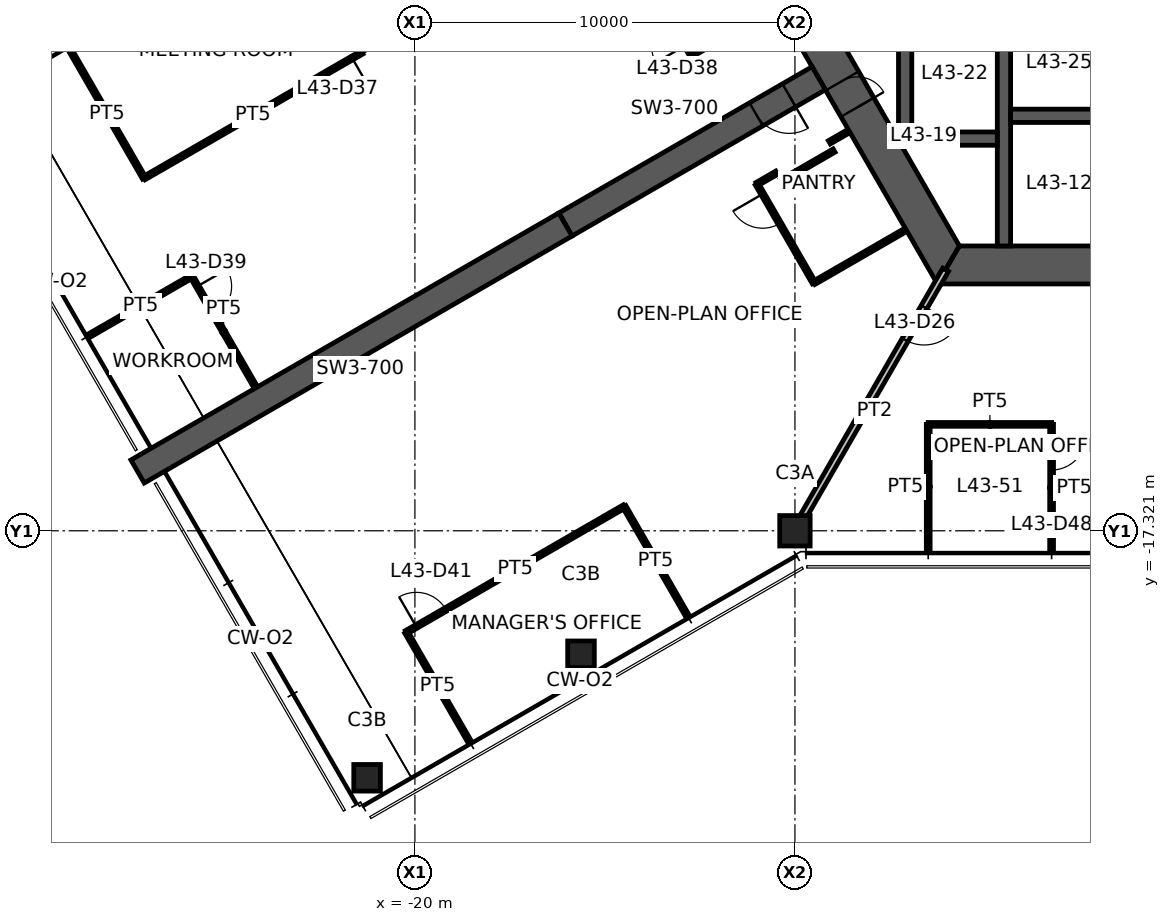
"""IFC4 building model, lengths in metres.
Left out: names, types, materials, properties, quantities, classifications, styles, units other than length and angle.
Written with IfcOpenShell. Run it as: python <this file> out.ifc"""

import sys

from ifc_helpers import new_model, si_unit, direction, frame, frame_2d, origin, origin_2d, place, context, subcontext, project, spatial, polyline, rectangle, hollow_rectangle, outline, extrude, element, fill, save


model = new_model("IFC4")
c1 = context("Model", 3, precision=1e-05, world=origin(), true_north=direction((0.0, 1.0)))
c2 = subcontext(c1, "Body", "Model", "MODEL_VIEW")
j1 = project(units=[si_unit("LENGTHUNIT", "METRE"), si_unit("PLANEANGLEUNIT", "RADIAN")], contexts=[c1])
p1 = place(None, origin())
s1 = spatial("IfcSite", under=j1, at=p1, CompositionType="ELEMENT")
p2 = place(p1, origin())
s2 = spatial("IfcBuilding", under=s1, at=p2, CompositionType="ELEMENT")
p3 = place(p2, frame((0.0, 0.0, 172.1)))
s3 = spatial("IfcBuildingStorey", under=s2, at=p3, CompositionType="ELEMENT", Elevation=172.1)
p4 = place(p3, frame((-10.0, -17.321, 0.0), z_axis=(0.0, 0.0, 1.0), x_axis=(1.0, 0.0, 0.0)))
e1 = element("IfcColumn", 1, at=p4, inside=s3, PredefinedType="COLUMN", context=c2, shape_type="SweptSolid", body=[
    extrude(hollow_rectangle(XDim=0.8, YDim=0.8, WallThickness=0.045, at=origin_2d()), origin(), (0.0, 0.0, 1.0), 3.9),
])
for number, where, z_axis, x_axis in (
    (2, (-15.629, -20.571, 0.0), (0.0, 0.0, 1.0), (1.0, 0.0, 0.0)),
    (3, (-21.258, -23.821, 0.0), (0.0, 0.0, 1.0), (1.0, 0.0, 0.0)),
):
    element("IfcColumn", number, at=place(p3, frame(where, z_axis=z_axis, x_axis=x_axis)), inside=s3, PredefinedType="COLUMN", context=c2, shape_type="SweptSolid", body=[
        extrude(hollow_rectangle(XDim=0.7, YDim=0.7, WallThickness=0.036, at=origin_2d()), origin(), (0.0, 0.0, 1.0), 3.9),
    ])
p5 = place(p3, frame((-11.922, 0.0, 0.0), z_axis=(0.0, 0.0, 1.0), x_axis=(0.500004296715, -0.866022923061, 0.0)))
e4 = element("IfcWall", 4, at=p5, inside=s3, PredefinedType="SHEAR", context=c2, shape_type="SweptSolid", body=[
    extrude(outline(polyline([(-0.289, -0.5), (6.331, -0.5), (7.131, -0.5), (12.211, -0.5), (11.634, 0.5), (7.131, 0.5), (6.331, 0.5), (0.289, 0.5), (-0.289, -0.5)])), origin(), (0.0, 0.0, 1.0), 3.9),
])
p6 = place(p5, frame((6.331, 0.0, 0.0)))
e5 = element("IfcOpeningElement", 5, at=p6, cuts=e4, PredefinedType="OPENING", context=c2, shape_type="SweptSolid", body=[
    extrude(rectangle(XDim=0.8, YDim=2.1, at=frame_2d((0.4, 1.05))), frame((0.0, 0.51, 0.0), z_axis=(0.0, -1.0, 0.0), x_axis=(1.0, 0.0, 0.0)), (0.0, 0.0, 1.0), 1.02),
])
p7 = place(p3, frame((-5.961, -10.325, 0.0), z_axis=(0.0, 0.0, 1.0), x_axis=(1.0, 0.0, 0.0)))
e6 = element("IfcWall", 6, at=p7, inside=s3, PredefinedType="SHEAR", context=c2, shape_type="SweptSolid", body=[
    extrude(outline(polyline([(-0.289, -0.5), (5.461, -0.5), (6.461, -0.5), (12.211, -0.5), (11.634, 0.5), (6.461, 0.5), (5.461, 0.5), (0.289, 0.5), (-0.289, -0.5)])), origin(), (0.0, 0.0, 1.0), 3.9),
])
p8 = place(p7, frame((5.461, 0.0, 0.0)))
e7 = element("IfcOpeningElement", 7, at=p8, cuts=e6, PredefinedType="OPENING", context=c2, shape_type="SweptSolid", body=[
    extrude(rectangle(XDim=1.0, YDim=2.1, at=frame_2d((0.5, 1.05))), frame((0.0, 0.51, 0.0), z_axis=(0.0, -1.0, 0.0), x_axis=(1.0, 0.0, 0.0)), (0.0, 0.0, 1.0), 1.02),
])
p9 = place(p3, frame((-9.375, -5.413, 0.0), z_axis=(0.0, 0.0, 1.0), x_axis=(-0.866032377459, -0.499987921047, 0.0)))
e8 = element("IfcWall", 8, at=p9, inside=s3, PredefinedType="SHEAR", context=c2, shape_type="SweptSolid", body=[
    extrude(rectangle(XDim=7.696, YDim=0.7, at=frame_2d((3.848, 0.0))), origin(), (0.0, 0.0, 1.0), 3.9),
])
p10 = place(p9, frame((0.9, 0.0, 0.0)))
e9 = element("IfcOpeningElement", 9, at=p10, cuts=e8, PredefinedType="OPENING", context=c2, shape_type="SweptSolid", body=[
    extrude(rectangle(XDim=1.0, YDim=2.1, at=frame_2d((0.5, 1.05))), frame((0.0, 0.36, 0.0), z_axis=(0.0, -1.0, 0.0), x_axis=(1.0, 0.0, 0.0)), (0.0, 0.0, 1.0), 0.72),
])
p11 = place(p3, frame((-16.039, -9.26, 0.0), z_axis=(0.0, 0.0, 1.0), x_axis=(-0.866024837091, -0.50000098154, 0.0)))
e10 = element("IfcWall", 10, at=p11, inside=s3, PredefinedType="SHEAR", context=c2, shape_type="SweptSolid", body=[
    extrude(rectangle(XDim=13.0, YDim=0.7, at=frame_2d((6.5, 0.0))), origin(), (0.0, 0.0, 1.0), 3.9),
])
p12 = place(p3, frame((-4.5, -3.775, 0.0), z_axis=(0.0, 0.0, 1.0), x_axis=(0.0, -1.0, 0.0)))
e11 = element("IfcWall", 11, at=p12, inside=s3, PredefinedType="SHEAR", context=c2, shape_type="SweptSolid", body=[
    extrude(rectangle(XDim=6.05, YDim=0.35, at=frame_2d((3.025, 0.0))), origin(), (0.0, 0.0, 1.0), 3.9),
])
p13 = place(p3, frame((-4.325, -6.4, 0.0), z_axis=(0.0, 0.0, 1.0), x_axis=(1.0, 0.0, 0.0)))
e12 = element("IfcWall", 12, at=p13, inside=s3, PredefinedType="SHEAR", context=c2, shape_type="SweptSolid", body=[
    extrude(rectangle(XDim=2.55, YDim=0.35, at=frame_2d((1.275, 0.0))), origin(), (0.0, 0.0, 1.0), 3.9),
])
p14 = place(p3, frame((-6.925, -7.0, 0.0), z_axis=(0.0, 0.0, 1.0), x_axis=(1.0, 0.0, 0.0)))
e13 = element("IfcWall", 13, at=p14, inside=s3, PredefinedType="SHEAR", context=c2, shape_type="SweptSolid", body=[
    extrude(rectangle(XDim=2.25, YDim=0.35, at=frame_2d((1.125, 0.0))), origin(), (0.0, 0.0, 1.0), 3.9),
])
p15 = place(p3, frame((-7.1, -3.775, 0.0), z_axis=(0.0, 0.0, 1.0), x_axis=(0.0, -1.0, 0.0)))
e14 = element("IfcWall", 14, at=p15, inside=s3, PredefinedType="SHEAR", context=c2, shape_type="SweptSolid", body=[
    extrude(outline(polyline([(0.0, -0.175), (3.274, -0.175), (3.4, 0.0), (3.4, 0.175), (0.0, 0.175), (0.0, -0.175)])), origin(), (0.0, 0.0, 1.0), 3.9),
])
p16 = place(p3, frame((-6.035, -10.453, 0.0), z_axis=(0.0, 0.0, 1.0), x_axis=(-0.499989830942, -0.866031274813, 0.0)))
e15 = element("IfcWall", 15, at=p16, inside=s3, PredefinedType="PARTITIONING", context=c2, shape_type="SweptSolid", body=[
    extrude(rectangle(XDim=7.93, YDim=0.175, at=frame_2d((3.965, 0.0))), origin(), (0.0, 0.0, 1.0), 3.05),
])
p17 = place(p16, frame((1.13, 0.0, 0.0)))
e16 = element("IfcOpeningElement", 16, at=p17, cuts=e15, PredefinedType="OPENING", context=c2, shape_type="SweptSolid", body=[
    extrude(rectangle(XDim=1.0, YDim=2.1, at=frame_2d((0.5, 1.05))), frame((0.0, 0.098, 0.0), z_axis=(0.0, -1.0, 0.0), x_axis=(1.0, 0.0, 0.0)), (0.0, 0.0, 1.0), 0.195),
])
p18 = place(p3, frame((-27.125, -8.04, 0.0), z_axis=(0.0, 0.0, 1.0), x_axis=(-0.499978621081, 0.866037746557, 0.0)))
e17 = element("IfcWall", 17, at=p18, inside=s3, PredefinedType="PARTITIONING", context=c2, shape_type="SweptSolid", body=[
    extrude(rectangle(XDim=3.905, YDim=0.1, at=frame_2d((1.953, 0.0))), origin(), (0.0, 0.0, 1.0), 2.95),
])
p19 = place(p3, frame((-23.332, -1.37, 0.0), z_axis=(0.0, 0.0, 1.0), x_axis=(0.500043804875, -0.866000111551, 0.0)))
e18 = element("IfcWall", 18, at=p19, inside=s3, PredefinedType="PARTITIONING", context=c2, shape_type="SweptSolid", body=[
    extrude(rectangle(XDim=3.88, YDim=0.1, at=frame_2d((1.94, 0.0))), origin(), (0.0, 0.0, 1.0), 2.95),
])
p20 = place(p3, frame((-21.392, -4.73, 0.0), z_axis=(0.0, 0.0, 1.0), x_axis=(-0.866030817826, -0.499990622488, 0.0)))
e19 = element("IfcWall", 19, at=p20, inside=s3, PredefinedType="PARTITIONING", context=c2, shape_type="SweptSolid", body=[
    extrude(rectangle(XDim=6.62, YDim=0.1, at=frame_2d((3.31, 0.0))), origin(), (0.0, 0.0, 1.0), 2.95),
])
p21 = place(p20, frame((0.3, 0.0, 0.0)))
e20 = element("IfcOpeningElement", 20, at=p21, cuts=e19, PredefinedType="OPENING", context=c2, shape_type="SweptSolid", body=[
    extrude(rectangle(XDim=0.9, YDim=2.1, at=frame_2d((0.45, 1.05))), frame((0.0, 0.06, 0.0), z_axis=(0.0, -1.0, 0.0), x_axis=(1.0, 0.0, 0.0)), (0.0, 0.0, 1.0), 0.12),
])
p22 = place(p3, frame((-12.726, -4.807, 0.0), z_axis=(0.0, 0.0, 1.0), x_axis=(-0.500062241894, 0.865989465428, 0.0)))
e21 = element("IfcWall", 21, at=p22, inside=s3, PredefinedType="PARTITIONING", context=c2, shape_type="SweptSolid", body=[
    extrude(rectangle(XDim=3.4, YDim=0.1, at=frame_2d((1.7, 0.0))), origin(), (0.0, 0.0, 1.0), 2.95),
])
p23 = place(p22, frame((0.3, 0.0, 0.0)))
e22 = element("IfcOpeningElement", 22, at=p23, cuts=e21, PredefinedType="OPENING", context=c2, shape_type="SweptSolid", body=[
    extrude(rectangle(XDim=0.9, YDim=2.1, at=frame_2d((0.45, 1.05))), frame((0.0, 0.06, 0.0), z_axis=(0.0, -1.0, 0.0), x_axis=(1.0, 0.0, 0.0)), (0.0, 0.0, 1.0), 0.12),
])
p24 = place(p3, frame((-10.492, -3.517, 0.0), z_axis=(0.0, 0.0, 1.0), x_axis=(-0.866021702275, -0.500006411147, 0.0)))
e23 = element("IfcWall", 23, at=p24, inside=s3, PredefinedType="PARTITIONING", context=c2, shape_type="SweptSolid", body=[
    extrude(rectangle(XDim=2.58, YDim=0.1, at=frame_2d((1.29, 0.0))), origin(), (0.0, 0.0, 1.0), 2.95),
])
p25 = place(p3, frame((-28.562, -12.18, 0.0), z_axis=(0.0, 0.0, 1.0), x_axis=(0.866042875753, 0.499969736442, 0.0)))
e24 = element("IfcWall", 24, at=p25, inside=s3, PredefinedType="PARTITIONING", context=c2, shape_type="SweptSolid", body=[
    extrude(rectangle(XDim=3.105, YDim=0.1, at=frame_2d((1.553, 0.0))), origin(), (0.0, 0.0, 1.0), 2.95),
])
p26 = place(p3, frame((-25.873, -10.627, 0.0), z_axis=(0.0, 0.0, 1.0), x_axis=(0.5000115033, -0.866018762249, 0.0)))
e25 = element("IfcWall", 25, at=p26, inside=s3, PredefinedType="PARTITIONING", context=c2, shape_type="SweptSolid", body=[
    extrude(rectangle(XDim=3.363, YDim=0.1, at=frame_2d((1.682, 0.0))), origin(), (0.0, 0.0, 1.0), 2.95),
])
p27 = place(p26, frame((0.3, 0.0, 0.0)))
e26 = element("IfcOpeningElement", 26, at=p27, cuts=e25, PredefinedType="OPENING", context=c2, shape_type="SweptSolid", body=[
    extrude(rectangle(XDim=0.9, YDim=2.1, at=frame_2d((0.45, 1.05))), frame((0.0, 0.06, 0.0), z_axis=(0.0, -1.0, 0.0), x_axis=(1.0, 0.0, 0.0)), (0.0, 0.0, 1.0), 0.12),
])
p28 = place(p3, frame((-11.0, -8.198, 0.0), z_axis=(0.0, 0.0, 1.0), x_axis=(0.866131372301, 0.499816412211, 0.0)))
e27 = element("IfcWall", 27, at=p28, inside=s3, PredefinedType="PARTITIONING", context=c2, shape_type="SweptSolid", body=[
    extrude(rectangle(XDim=0.6, YDim=0.1, at=frame_2d((0.3, 0.0))), origin(), (0.0, 0.0, 1.0), 2.95),
])
p29 = place(p3, frame((-10.355, -8.115, 0.0), z_axis=(0.0, 0.0, 1.0), x_axis=(0.866094119867, 0.499880961361, 0.0)))
e28 = element("IfcWall", 28, at=p29, inside=s3, PredefinedType="PARTITIONING", context=c2, shape_type="SweptSolid", body=[
    extrude(rectangle(XDim=1.6, YDim=0.1, at=frame_2d((0.8, 0.0))), origin(), (0.0, 0.0, 1.0), 2.95),
])
p30 = place(p3, frame((-9.5, -10.796, 0.0), z_axis=(0.0, 0.0, 1.0), x_axis=(-0.499990139034, 0.866031096941, 0.0)))
e29 = element("IfcWall", 29, at=p30, inside=s3, PredefinedType="PARTITIONING", context=c2, shape_type="SweptSolid", body=[
    extrude(rectangle(XDim=3.0, YDim=0.1, at=frame_2d((1.5, 0.0))), origin(), (0.0, 0.0, 1.0), 2.95),
])
p31 = place(p30, frame((1.8, 0.0, 0.0)))
e30 = element("IfcOpeningElement", 30, at=p31, cuts=e29, PredefinedType="OPENING", context=c2, shape_type="SweptSolid", body=[
    extrude(rectangle(XDim=0.9, YDim=2.1, at=frame_2d((0.45, 1.05))), frame((0.0, 0.06, 0.0), z_axis=(0.0, -1.0, 0.0), x_axis=(1.0, 0.0, 0.0)), (0.0, 0.0, 1.0), 0.12),
])
p32 = place(p3, frame((-9.094, -7.098, 0.0), z_axis=(0.0, 0.0, 1.0), x_axis=(0.865954211699, 0.50012328804, 0.0)))
e31 = element("IfcWall", 31, at=p32, inside=s3, PredefinedType="PARTITIONING", context=c2, shape_type="SweptSolid", body=[
    extrude(rectangle(XDim=0.58, YDim=0.1, at=frame_2d((0.29, 0.0))), origin(), (0.0, 0.0, 1.0), 2.95),
])
p33 = place(p3, frame((-7.092, -9.406, 0.0), z_axis=(0.0, 0.0, 1.0), x_axis=(-0.86603494908, -0.499983466698, 0.0)))
e32 = element("IfcWall", 32, at=p33, inside=s3, PredefinedType="PARTITIONING", context=c2, shape_type="SweptSolid", body=[
    extrude(rectangle(XDim=2.78, YDim=0.1, at=frame_2d((1.39, 0.0))), origin(), (0.0, 0.0, 1.0), 2.95),
])
p34 = place(p3, frame((-20.225, -19.991, 0.0), z_axis=(0.0, 0.0, 1.0), x_axis=(0.866030817826, 0.499990622488, 0.0)))
e33 = element("IfcWall", 33, at=p34, inside=s3, PredefinedType="PARTITIONING", context=c2, shape_type="SweptSolid", body=[
    extrude(rectangle(XDim=6.62, YDim=0.1, at=frame_2d((3.31, 0.0))), origin(), (0.0, 0.0, 1.0), 2.95),
])
p35 = place(p34, frame((0.3, 0.0, 0.0)))
e34 = element("IfcOpeningElement", 34, at=p35, cuts=e33, PredefinedType="OPENING", context=c2, shape_type="SweptSolid", body=[
    extrude(rectangle(XDim=0.9, YDim=2.1, at=frame_2d((0.45, 1.05))), frame((0.0, 0.06, 0.0), z_axis=(0.0, -1.0, 0.0), x_axis=(1.0, 0.0, 0.0)), (0.0, 0.0, 1.0), 0.12),
])
p36 = place(p3, frame((-18.585, -22.831, 0.0), z_axis=(0.0, 0.0, 1.0), x_axis=(-0.50002956483, 0.866008333849, 0.0)))
e35 = element("IfcWall", 35, at=p36, inside=s3, PredefinedType="PARTITIONING", context=c2, shape_type="SweptSolid", body=[
    extrude(rectangle(XDim=3.28, YDim=0.1, at=frame_2d((1.64, 0.0))), origin(), (0.0, 0.0, 1.0), 2.95),
])
p37 = place(p3, frame((-14.492, -16.681, 0.0), z_axis=(0.0, 0.0, 1.0), x_axis=(0.500008057651, -0.866020751647, 0.0)))
e36 = element("IfcWall", 36, at=p37, inside=s3, PredefinedType="PARTITIONING", context=c2, shape_type="SweptSolid", body=[
    extrude(rectangle(XDim=3.305, YDim=0.1, at=frame_2d((1.653, 0.0))), origin(), (0.0, 0.0, 1.0), 2.95),
])
p38 = place(p3, frame((-6.493, -17.801, 0.0), z_axis=(0.0, 0.0, 1.0), x_axis=(0.0, 1.0, 0.0)))
e37 = element("IfcWall", 37, at=p38, inside=s3, PredefinedType="PARTITIONING", context=c2, shape_type="SweptSolid", body=[
    extrude(rectangle(XDim=3.28, YDim=0.1, at=frame_2d((1.64, 0.0))), origin(), (0.0, 0.0, 1.0), 2.95),
])
p39 = place(p3, frame((-6.493, -14.521, 0.0), z_axis=(0.0, 0.0, 1.0), x_axis=(1.0, 0.0, 0.0)))
e38 = element("IfcWall", 38, at=p39, inside=s3, PredefinedType="PARTITIONING", context=c2, shape_type="SweptSolid", body=[
    extrude(rectangle(XDim=3.247, YDim=0.1, at=frame_2d((1.623, 0.0))), origin(), (0.0, 0.0, 1.0), 2.95),
])
p40 = place(p3, frame((-3.246, -14.521, 0.0), z_axis=(0.0, 0.0, 1.0), x_axis=(0.0, -1.0, 0.0)))
e39 = element("IfcWall", 39, at=p40, inside=s3, PredefinedType="PARTITIONING", context=c2, shape_type="SweptSolid", body=[
    extrude(rectangle(XDim=3.33, YDim=0.1, at=frame_2d((1.665, 0.0))), origin(), (0.0, 0.0, 1.0), 2.95),
])
p41 = place(p40, frame((0.3, 0.0, 0.0)))
e40 = element("IfcOpeningElement", 40, at=p41, cuts=e39, PredefinedType="OPENING", context=c2, shape_type="SweptSolid", body=[
    extrude(rectangle(XDim=0.9, YDim=2.1, at=frame_2d((0.45, 1.05))), frame((0.0, 0.06, 0.0), z_axis=(0.0, -1.0, 0.0), x_axis=(1.0, 0.0, 0.0)), (0.0, 0.0, 1.0), 0.12),
])
p42 = place(p6, origin())
e41 = element("IfcDoor", 41, at=p42, inside=s3, OperationType="SINGLE_SWING_RIGHT", PredefinedType="DOOR", context=c2, shape_type="SweptSolid", body=[
    extrude(rectangle(XDim=0.8, YDim=2.1, at=frame_2d((0.4, 1.05))), frame((0.0, 0.025, 0.0), z_axis=(0.0, -1.0, 0.0), x_axis=(1.0, 0.0, 0.0)), (0.0, 0.0, 1.0), 0.05),
])
fill(e5, e41)
p43 = place(p10, origin())
e42 = element("IfcDoor", 42, at=p43, inside=s3, OperationType="SINGLE_SWING_LEFT", PredefinedType="DOOR", context=c2, shape_type="SweptSolid", body=[
    extrude(rectangle(XDim=1.0, YDim=2.1, at=frame_2d((0.5, 1.05))), frame((0.0, 0.025, 0.0), z_axis=(0.0, -1.0, 0.0), x_axis=(1.0, 0.0, 0.0)), (0.0, 0.0, 1.0), 0.05),
])
fill(e9, e42)
p44 = place(p17, origin())
e43 = element("IfcDoor", 43, at=p44, inside=s3, OperationType="SINGLE_SWING_LEFT", PredefinedType="DOOR", context=c2, shape_type="SweptSolid", body=[
    extrude(rectangle(XDim=1.0, YDim=2.1, at=frame_2d((0.5, 1.05))), frame((0.0, 0.025, 0.0), z_axis=(0.0, -1.0, 0.0), x_axis=(1.0, 0.0, 0.0)), (0.0, 0.0, 1.0), 0.05),
])
fill(e16, e43)
p45 = place(p21, origin())
e44 = element("IfcDoor", 44, at=p45, inside=s3, OperationType="SINGLE_SWING_LEFT", PredefinedType="DOOR", context=c2, shape_type="SweptSolid", body=[
    extrude(rectangle(XDim=0.9, YDim=2.1, at=frame_2d((0.45, 1.05))), frame((0.0, 0.025, 0.0), z_axis=(0.0, -1.0, 0.0), x_axis=(1.0, 0.0, 0.0)), (0.0, 0.0, 1.0), 0.05),
])
fill(e20, e44)
p46 = place(p27, origin())
e45 = element("IfcDoor", 45, at=p46, inside=s3, OperationType="SINGLE_SWING_LEFT", PredefinedType="DOOR", context=c2, shape_type="SweptSolid", body=[
    extrude(rectangle(XDim=0.9, YDim=2.1, at=frame_2d((0.45, 1.05))), frame((0.0, 0.025, 0.0), z_axis=(0.0, -1.0, 0.0), x_axis=(1.0, 0.0, 0.0)), (0.0, 0.0, 1.0), 0.05),
])
fill(e26, e45)
p47 = place(p31, origin())
e46 = element("IfcDoor", 46, at=p47, inside=s3, OperationType="SINGLE_SWING_RIGHT", PredefinedType="DOOR", context=c2, shape_type="SweptSolid", body=[
    extrude(rectangle(XDim=0.9, YDim=2.1, at=frame_2d((0.45, 1.05))), frame((0.0, 0.025, 0.0), z_axis=(0.0, -1.0, 0.0), x_axis=(1.0, 0.0, 0.0)), (0.0, 0.0, 1.0), 0.05),
])
fill(e30, e46)
p48 = place(p35, origin())
e47 = element("IfcDoor", 47, at=p48, inside=s3, OperationType="SINGLE_SWING_LEFT", PredefinedType="DOOR", context=c2, shape_type="SweptSolid", body=[
    extrude(rectangle(XDim=0.9, YDim=2.1, at=frame_2d((0.45, 1.05))), frame((0.0, 0.025, 0.0), z_axis=(0.0, -1.0, 0.0), x_axis=(1.0, 0.0, 0.0)), (0.0, 0.0, 1.0), 0.05),
])
fill(e34, e47)
p49 = place(p41, origin())
e48 = element("IfcDoor", 48, at=p49, inside=s3, OperationType="SINGLE_SWING_LEFT", PredefinedType="DOOR", context=c2, shape_type="SweptSolid", body=[
    extrude(rectangle(XDim=0.9, YDim=2.1, at=frame_2d((0.45, 1.05))), frame((0.0, 0.025, 0.0), z_axis=(0.0, -1.0, 0.0), x_axis=(1.0, 0.0, 0.0)), (0.0, 0.0, 1.0), 0.05),
])
fill(e40, e48)
save(model, sys.argv[1])
